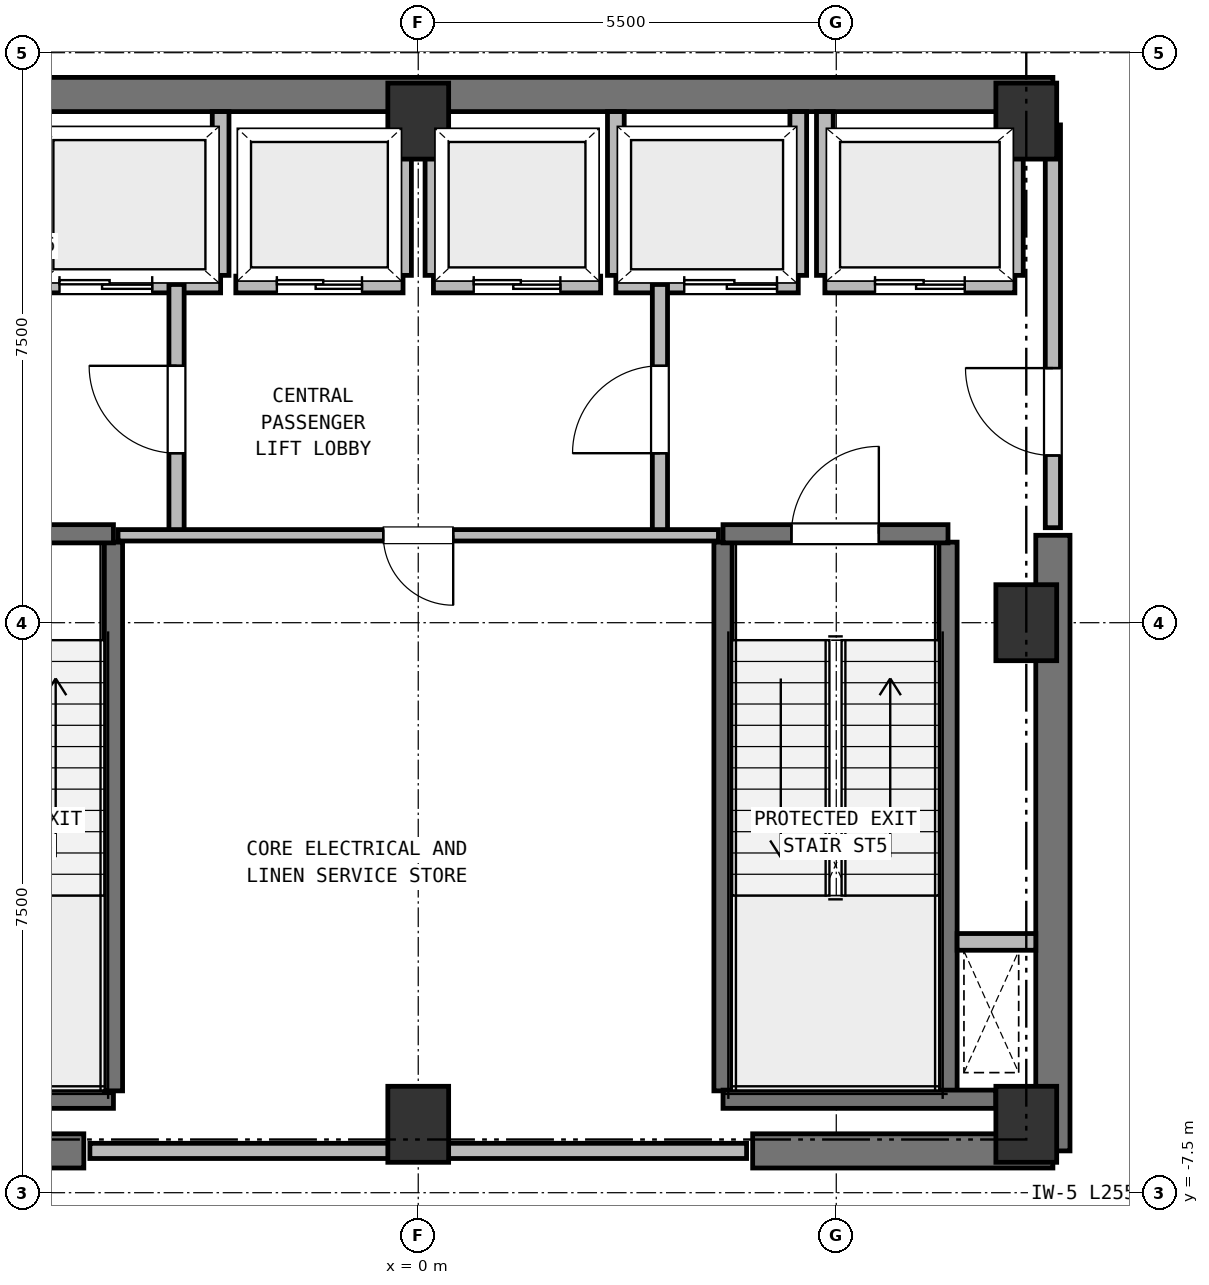
"""IFC4 building model, lengths in metres.
Left out: names, types, materials, properties, quantities, classifications, styles, units other than length and angle.
Written with IfcOpenShell. Run it as: python <this file> out.ifc"""

import sys

from ifc_helpers import new_model, si_unit, direction, frame, frame_2d, origin, origin_2d, place, context, subcontext, project, spatial, rectangle, extrude, element, fill, save


model = new_model("IFC4")
c1 = context("Model", 3, precision=1e-05, world=origin(), true_north=direction((0.0, 1.0)))
c2 = subcontext(c1, "Body", "Model", "MODEL_VIEW")
j1 = project(units=[si_unit("LENGTHUNIT", "METRE"), si_unit("PLANEANGLEUNIT", "RADIAN")], contexts=[c1])
p1 = place(None, origin())
s1 = spatial("IfcSite", under=j1, at=p1, CompositionType="ELEMENT")
p2 = place(p1, origin())
s2 = spatial("IfcBuilding", under=s1, at=p2, CompositionType="ELEMENT")
p3 = place(p2, frame((0.0, 0.0, 272.8)))
s3 = spatial("IfcBuildingStorey", under=s2, at=p3, CompositionType="ELEMENT", Elevation=272.8)
for number, where, z_axis, x_axis in (
    (1, (0.0, -6.6, 0.0), (0.0, 0.0, 1.0), (1.0, 0.0, 0.0)),
    (2, (8.0, -6.6, 0.0), (0.0, 0.0, 1.0), (1.0, 0.0, 0.0)),
    (3, (8.0, 0.0, 0.0), (0.0, 0.0, 1.0), (1.0, 0.0, 0.0)),
    (4, (8.0, 6.6, 0.0), (0.0, 0.0, 1.0), (1.0, 0.0, 0.0)),
    (5, (0.0, 6.6, 0.0), (0.0, 0.0, 1.0), (1.0, 0.0, 0.0)),
):
    element("IfcColumn", number, at=place(p3, frame(where, z_axis=z_axis, x_axis=x_axis)), inside=s3, PredefinedType="COLUMN", context=c2, shape_type="SweptSolid", body=[
        extrude(rectangle(XDim=0.8, YDim=1.0, at=origin_2d()), origin(), (0.0, 0.0, 1.0), 4.4),
    ])
p4 = place(p3, frame((-8.35, 6.95, 0.0), z_axis=(0.0, 0.0, 1.0), x_axis=(1.0, 0.0, 0.0)))
e6 = element("IfcWall", 6, at=p4, inside=s3, PredefinedType="SHEAR", context=c2, shape_type="SweptSolid", body=[
    extrude(rectangle(XDim=16.7, YDim=0.45, at=frame_2d((8.35, 0.0))), origin(), (0.0, 0.0, 1.0), 4.15),
])
for number, where, z_axis, x_axis in (
    (7, (-8.35, -6.95, 0.0), (0.0, 0.0, 1.0), (1.0, 0.0, 0.0)),
    (8, (4.4, -6.95, 0.0), (0.0, 0.0, 1.0), (1.0, 0.0, 0.0)),
):
    element("IfcWall", number, at=place(p3, frame(where, z_axis=z_axis, x_axis=x_axis)), inside=s3, PredefinedType="SHEAR", context=c2, shape_type="SweptSolid", body=[
        extrude(rectangle(XDim=3.95, YDim=0.45, at=frame_2d((1.975, 0.0))), origin(), (0.0, 0.0, 1.0), 4.15),
    ])
p5 = place(p3, frame((8.35, -6.95, 0.0), z_axis=(0.0, 0.0, 1.0), x_axis=(0.0, 1.0, 0.0)))
e9 = element("IfcWall", 9, at=p5, inside=s3, PredefinedType="SHEAR", context=c2, shape_type="SweptSolid", body=[
    extrude(rectangle(XDim=8.1, YDim=0.45, at=frame_2d((4.05, 0.0))), origin(), (0.0, 0.0, 1.0), 4.15),
])
p6 = place(p3, frame((-7.6, -6.27, 0.0), z_axis=(0.0, 0.0, 1.0), x_axis=(1.0, 0.0, 0.0)))
e10 = element("IfcWall", 10, at=p6, inside=s3, PredefinedType="SHEAR", context=c2, shape_type="SweptSolid", body=[
    extrude(rectangle(XDim=3.59, YDim=0.24, at=frame_2d((1.795, 0.0))), origin(), (0.0, 0.0, 1.0), 4.15),
])
p7 = place(p3, frame((-4.01, -6.16, 0.0), z_axis=(0.0, 0.0, 1.0), x_axis=(0.0, 1.0, 0.0)))
e11 = element("IfcWall", 11, at=p7, inside=s3, PredefinedType="SHEAR", context=c2, shape_type="SweptSolid", body=[
    extrude(rectangle(XDim=7.22, YDim=0.24, at=frame_2d((3.61, 0.0))), origin(), (0.0, 0.0, 1.0), 4.15),
])
p8 = place(p3, frame((-6.97, 1.17, 0.0), z_axis=(0.0, 0.0, 1.0), x_axis=(1.0, 0.0, 0.0)))
e12 = element("IfcWall", 12, at=p8, inside=s3, PredefinedType="SHEAR", context=c2, shape_type="SweptSolid", body=[
    extrude(rectangle(XDim=2.96, YDim=0.24, at=frame_2d((1.48, 0.0))), origin(), (0.0, 0.0, 1.0), 4.15),
])
p9 = place(p8, frame((0.9, 0.0, 0.0)))
e13 = element("IfcOpeningElement", 13, at=p9, cuts=e12, PredefinedType="OPENING", context=c2, shape_type="SweptSolid", body=[
    extrude(rectangle(XDim=1.15, YDim=2.15, at=frame_2d((0.575, 1.075))), frame((0.0, 0.13, 0.0), z_axis=(0.0, -1.0, 0.0), x_axis=(1.0, 0.0, 0.0)), (0.0, 0.0, 1.0), 0.26),
])
for number, where, z_axis, x_axis in (
    (14, (4.01, -6.16, 0.0), (0.0, 0.0, 1.0), (0.0, 1.0, 0.0)),
    (15, (6.97, -6.16, 0.0), (0.0, 0.0, 1.0), (0.0, 1.0, 0.0)),
):
    element("IfcWall", number, at=place(p3, frame(where, z_axis=z_axis, x_axis=x_axis)), inside=s3, PredefinedType="SHEAR", context=c2, shape_type="SweptSolid", body=[
        extrude(rectangle(XDim=7.22, YDim=0.24, at=frame_2d((3.61, 0.0))), origin(), (0.0, 0.0, 1.0), 4.15),
    ])
p10 = place(p3, frame((4.01, -6.27, 0.0), z_axis=(0.0, 0.0, 1.0), x_axis=(1.0, 0.0, 0.0)))
e16 = element("IfcWall", 16, at=p10, inside=s3, PredefinedType="SHEAR", context=c2, shape_type="SweptSolid", body=[
    extrude(rectangle(XDim=3.59, YDim=0.24, at=frame_2d((1.795, 0.0))), origin(), (0.0, 0.0, 1.0), 4.15),
])
p11 = place(p3, frame((4.01, 1.17, 0.0), z_axis=(0.0, 0.0, 1.0), x_axis=(1.0, 0.0, 0.0)))
e17 = element("IfcWall", 17, at=p11, inside=s3, PredefinedType="SHEAR", context=c2, shape_type="SweptSolid", body=[
    extrude(rectangle(XDim=2.96, YDim=0.24, at=frame_2d((1.48, 0.0))), origin(), (0.0, 0.0, 1.0), 4.15),
])
p12 = place(p11, frame((0.9, 0.0, 0.0)))
e18 = element("IfcOpeningElement", 18, at=p12, cuts=e17, PredefinedType="OPENING", context=c2, shape_type="SweptSolid", body=[
    extrude(rectangle(XDim=1.15, YDim=2.15, at=frame_2d((0.575, 1.075))), frame((0.0, 0.13, 0.0), z_axis=(0.0, -1.0, 0.0), x_axis=(1.0, 0.0, 0.0)), (0.0, 0.0, 1.0), 0.26),
])
p13 = place(p3, frame((7.09, -4.2, 0.0), z_axis=(0.0, 0.0, 1.0), x_axis=(1.0, 0.0, 0.0)))
e19 = element("IfcWall", 19, at=p13, inside=s3, PredefinedType="PARTITIONING", context=c2, shape_type="SweptSolid", body=[
    extrude(rectangle(XDim=1.035, YDim=0.22, at=frame_2d((0.518, 0.0))), origin(), (0.0, 0.0, 1.0), 4.15),
])
p14 = place(p3, frame((5.35, 4.45, 0.0), z_axis=(0.0, 0.0, 1.0), x_axis=(1.0, 0.0, 0.0)))
e20 = element("IfcWall", 20, at=p14, inside=s3, PredefinedType="PARTITIONING", context=c2, shape_type="SweptSolid", body=[
    extrude(rectangle(XDim=2.5, YDim=0.22, at=frame_2d((1.25, 0.0))), origin(), (0.0, 0.0, 1.0), 4.15),
])
p15 = place(p14, frame((0.66, 0.0, 0.0)))
e21 = element("IfcOpeningElement", 21, at=p15, cuts=e20, PredefinedType="OPENING", context=c2, shape_type="SweptSolid", body=[
    extrude(rectangle(XDim=1.18, YDim=2.15, at=frame_2d((0.59, 1.075))), frame((0.0, 0.12, 0.0), z_axis=(0.0, -1.0, 0.0), x_axis=(1.0, 0.0, 0.0)), (0.0, 0.0, 1.0), 0.24),
])
p16 = place(p3, frame((5.35, 4.57, 0.0), z_axis=(0.0, 0.0, 1.0), x_axis=(0.0, 1.0, 0.0)))
e22 = element("IfcWall", 22, at=p16, inside=s3, PredefinedType="PARTITIONING", context=c2, shape_type="SweptSolid", body=[
    extrude(rectangle(XDim=2.155, YDim=0.22, at=frame_2d((1.078, 0.0))), origin(), (0.0, 0.0, 1.0), 4.15),
])
p17 = place(p3, frame((7.85, 4.57, 0.0), z_axis=(0.0, 0.0, 1.0), x_axis=(0.0, 1.0, 0.0)))
e23 = element("IfcWall", 23, at=p17, inside=s3, PredefinedType="PARTITIONING", context=c2, shape_type="SweptSolid", body=[
    extrude(rectangle(XDim=2.155, YDim=0.22, at=frame_2d((1.078, 0.0))), origin(), (0.0, 0.0, 1.0), 3.83),
])
p18 = place(p3, frame((-5.0, 4.45, 0.0), z_axis=(0.0, 0.0, 1.0), x_axis=(1.0, 0.0, 0.0)))
e24 = element("IfcWall", 24, at=p18, inside=s3, PredefinedType="PARTITIONING", context=c2, shape_type="SweptSolid", body=[
    extrude(rectangle(XDim=2.4, YDim=0.22, at=frame_2d((1.2, 0.0))), origin(), (0.0, 0.0, 1.0), 4.15),
])
p19 = place(p18, frame((0.28, 0.0, 0.0)))
e25 = element("IfcOpeningElement", 25, at=p19, cuts=e24, PredefinedType="OPENING", context=c2, shape_type="SweptSolid", body=[
    extrude(rectangle(XDim=1.22, YDim=2.15, at=frame_2d((0.61, 1.075))), frame((0.0, 0.12, 0.0), z_axis=(0.0, -1.0, 0.0), x_axis=(1.0, 0.0, 0.0)), (0.0, 0.0, 1.0), 0.24),
])
p20 = place(p3, frame((-2.6, 4.57, 0.0), z_axis=(0.0, 0.0, 1.0), x_axis=(0.0, 1.0, 0.0)))
e26 = element("IfcWall", 26, at=p20, inside=s3, PredefinedType="PARTITIONING", context=c2, shape_type="SweptSolid", body=[
    extrude(rectangle(XDim=2.155, YDim=0.22, at=frame_2d((1.078, 0.0))), origin(), (0.0, 0.0, 1.0), 4.15),
])
p21 = place(p3, frame((2.6, 4.45, 0.0), z_axis=(0.0, 0.0, 1.0), x_axis=(1.0, 0.0, 0.0)))
e27 = element("IfcWall", 27, at=p21, inside=s3, PredefinedType="PARTITIONING", context=c2, shape_type="SweptSolid", body=[
    extrude(rectangle(XDim=2.4, YDim=0.22, at=frame_2d((1.2, 0.0))), origin(), (0.0, 0.0, 1.0), 4.15),
])
p22 = place(p21, frame((0.9, 0.0, 0.0)))
e28 = element("IfcOpeningElement", 28, at=p22, cuts=e27, PredefinedType="OPENING", context=c2, shape_type="SweptSolid", body=[
    extrude(rectangle(XDim=1.22, YDim=2.15, at=frame_2d((0.61, 1.075))), frame((0.0, 0.12, 0.0), z_axis=(0.0, -1.0, 0.0), x_axis=(1.0, 0.0, 0.0)), (0.0, 0.0, 1.0), 0.24),
])
for number, where, z_axis, x_axis in (
    (29, (2.6, 4.57, 0.0), (0.0, 0.0, 1.0), (0.0, 1.0, 0.0)),
    (30, (5.0, 4.57, 0.0), (0.0, 0.0, 1.0), (0.0, 1.0, 0.0)),
):
    element("IfcWall", number, at=place(p3, frame(where, z_axis=z_axis, x_axis=x_axis)), inside=s3, PredefinedType="PARTITIONING", context=c2, shape_type="SweptSolid", body=[
        extrude(rectangle(XDim=2.155, YDim=0.22, at=frame_2d((1.078, 0.0))), origin(), (0.0, 0.0, 1.0), 4.15),
    ])
p23 = place(p3, frame((-2.4, 4.45, 0.0), z_axis=(0.0, 0.0, 1.0), x_axis=(1.0, 0.0, 0.0)))
e31 = element("IfcWall", 31, at=p23, inside=s3, PredefinedType="PARTITIONING", context=c2, shape_type="SweptSolid", body=[
    extrude(rectangle(XDim=2.2, YDim=0.22, at=frame_2d((1.1, 0.0))), origin(), (0.0, 0.0, 1.0), 4.15),
])
p24 = place(p23, frame((0.54, 0.0, 0.0)))
e32 = element("IfcOpeningElement", 32, at=p24, cuts=e31, PredefinedType="OPENING", context=c2, shape_type="SweptSolid", body=[
    extrude(rectangle(XDim=1.12, YDim=2.15, at=frame_2d((0.56, 1.075))), frame((0.0, 0.12, 0.0), z_axis=(0.0, -1.0, 0.0), x_axis=(1.0, 0.0, 0.0)), (0.0, 0.0, 1.0), 0.24),
])
p25 = place(p3, frame((-0.2, 4.57, 0.0), z_axis=(0.0, 0.0, 1.0), x_axis=(0.0, 1.0, 0.0)))
e33 = element("IfcWall", 33, at=p25, inside=s3, PredefinedType="PARTITIONING", context=c2, shape_type="SweptSolid", body=[
    extrude(rectangle(XDim=2.155, YDim=0.22, at=frame_2d((1.078, 0.0))), origin(), (0.0, 0.0, 1.0), 4.15),
])
p26 = place(p3, frame((0.2, 4.45, 0.0), z_axis=(0.0, 0.0, 1.0), x_axis=(1.0, 0.0, 0.0)))
e34 = element("IfcWall", 34, at=p26, inside=s3, PredefinedType="PARTITIONING", context=c2, shape_type="SweptSolid", body=[
    extrude(rectangle(XDim=2.2, YDim=0.22, at=frame_2d((1.1, 0.0))), origin(), (0.0, 0.0, 1.0), 4.15),
])
p27 = place(p26, frame((0.53, 0.0, 0.0)))
e35 = element("IfcOpeningElement", 35, at=p27, cuts=e34, PredefinedType="OPENING", context=c2, shape_type="SweptSolid", body=[
    extrude(rectangle(XDim=1.14, YDim=2.15, at=frame_2d((0.57, 1.075))), frame((0.0, 0.12, 0.0), z_axis=(0.0, -1.0, 0.0), x_axis=(1.0, 0.0, 0.0)), (0.0, 0.0, 1.0), 0.24),
])
p28 = place(p3, frame((0.2, 4.57, 0.0), z_axis=(0.0, 0.0, 1.0), x_axis=(0.0, 1.0, 0.0)))
e36 = element("IfcWall", 36, at=p28, inside=s3, PredefinedType="PARTITIONING", context=c2, shape_type="SweptSolid", body=[
    extrude(rectangle(XDim=2.155, YDim=0.22, at=frame_2d((1.078, 0.0))), origin(), (0.0, 0.0, 1.0), 4.15),
])
p29 = place(p3, frame((-3.18, 1.15, 0.0), z_axis=(0.0, 0.0, 1.0), x_axis=(0.0, 1.0, 0.0)))
e37 = element("IfcWall", 37, at=p29, inside=s3, PredefinedType="PARTITIONING", context=c2, shape_type="SweptSolid", body=[
    extrude(rectangle(XDim=3.3, YDim=0.2, at=frame_2d((1.65, 0.0))), origin(), (0.0, 0.0, 1.0), 4.15),
])
p30 = place(p29, frame((1.08, 0.0, 0.0)))
e38 = element("IfcOpeningElement", 38, at=p30, cuts=e37, PredefinedType="OPENING", context=c2, shape_type="SweptSolid", body=[
    extrude(rectangle(XDim=1.15, YDim=2.15, at=frame_2d((0.575, 1.075))), frame((0.0, 0.11, 0.0), z_axis=(0.0, -1.0, 0.0), x_axis=(1.0, 0.0, 0.0)), (0.0, 0.0, 1.0), 0.22),
])
p31 = place(p3, frame((3.18, 1.15, 0.0), z_axis=(0.0, 0.0, 1.0), x_axis=(0.0, 1.0, 0.0)))
e39 = element("IfcWall", 39, at=p31, inside=s3, PredefinedType="PARTITIONING", context=c2, shape_type="SweptSolid", body=[
    extrude(rectangle(XDim=3.3, YDim=0.2, at=frame_2d((1.65, 0.0))), origin(), (0.0, 0.0, 1.0), 4.15),
])
p32 = place(p31, frame((1.08, 0.0, 0.0)))
e40 = element("IfcOpeningElement", 40, at=p32, cuts=e39, PredefinedType="OPENING", context=c2, shape_type="SweptSolid", body=[
    extrude(rectangle(XDim=1.15, YDim=2.15, at=frame_2d((0.575, 1.075))), frame((0.0, 0.11, 0.0), z_axis=(0.0, -1.0, 0.0), x_axis=(1.0, 0.0, 0.0)), (0.0, 0.0, 1.0), 0.22),
])
p33 = place(p3, frame((8.35, 1.25, 0.0), z_axis=(0.0, 0.0, 1.0), x_axis=(0.0, 1.0, 0.0)))
e41 = element("IfcWall", 41, at=p33, inside=s3, PredefinedType="PARTITIONING", context=c2, shape_type="SweptSolid", body=[
    extrude(rectangle(XDim=5.3, YDim=0.2, at=frame_2d((2.65, 0.0))), origin(), (0.0, 0.0, 1.0), 4.15),
])
p34 = place(p33, frame((0.95, 0.0, 0.0)))
e42 = element("IfcOpeningElement", 42, at=p34, cuts=e41, PredefinedType="OPENING", context=c2, shape_type="SweptSolid", body=[
    extrude(rectangle(XDim=1.15, YDim=2.15, at=frame_2d((0.575, 1.075))), frame((0.0, 0.11, 0.0), z_axis=(0.0, -1.0, 0.0), x_axis=(1.0, 0.0, 0.0)), (0.0, 0.0, 1.0), 0.22),
])
p35 = place(p3, frame((3.95, 1.15, 0.0), z_axis=(0.0, 0.0, 1.0), x_axis=(-1.0, 0.0, 0.0)))
e43 = element("IfcWall", 43, at=p35, inside=s3, PredefinedType="PARTITIONING", context=c2, shape_type="SweptSolid", body=[
    extrude(rectangle(XDim=7.9, YDim=0.15, at=frame_2d((3.95, 0.0))), origin(), (0.0, 0.0, 1.0), 4.15),
])
p36 = place(p35, frame((3.49, 0.0, 0.0)))
e44 = element("IfcOpeningElement", 44, at=p36, cuts=e43, PredefinedType="OPENING", context=c2, shape_type="SweptSolid", body=[
    extrude(rectangle(XDim=0.92, YDim=2.05, at=frame_2d((0.46, 1.025))), frame((0.0, 0.085, 0.0), z_axis=(0.0, -1.0, 0.0), x_axis=(1.0, 0.0, 0.0)), (0.0, 0.0, 1.0), 0.17),
])
p37 = place(p3, frame((-4.32, -6.95, 0.0), z_axis=(0.0, 0.0, 1.0), x_axis=(1.0, 0.0, 0.0)))
e45 = element("IfcWall", 45, at=p37, inside=s3, PredefinedType="PARTITIONING", context=c2, shape_type="SweptSolid", body=[
    extrude(rectangle(XDim=8.64, YDim=0.2, at=frame_2d((4.32, 0.0))), origin(), (0.0, 0.0, 1.0), 4.15),
])
p38 = place(p3, frame((10.422, -7.309, 0.0), z_axis=(0.0, 0.0, 1.0), x_axis=(-0.693764562202, -0.720201869085, 0.0)))
e46 = element("IfcWall", 46, at=p38, inside=s3, PredefinedType="PARTITIONING", context=c2, shape_type="SweptSolid", body=[
    extrude(rectangle(XDim=2.558, YDim=0.15, at=frame_2d((1.279, 0.0))), origin(), (0.0, 0.0, 1.0), 4.15),
])
p39 = place(p12, origin())
e47 = element("IfcDoor", 47, at=p39, inside=s3, OperationType="SINGLE_SWING_RIGHT", PredefinedType="DOOR", context=c2, shape_type="SweptSolid", body=[
    extrude(rectangle(XDim=1.15, YDim=2.15, at=frame_2d((0.575, 1.075))), frame((0.0, 0.025, 0.0), z_axis=(0.0, -1.0, 0.0), x_axis=(1.0, 0.0, 0.0)), (0.0, 0.0, 1.0), 0.05),
])
fill(e18, e47)
p40 = place(p15, origin())
e48 = element("IfcDoor", 48, at=p40, inside=s3, OperationType="DOUBLE_DOOR_SLIDING", PredefinedType="DOOR", context=c2, shape_type="SweptSolid", body=[
    extrude(rectangle(XDim=1.18, YDim=2.15, at=frame_2d((0.59, 1.075))), frame((0.0, 0.025, 0.0), z_axis=(0.0, -1.0, 0.0), x_axis=(1.0, 0.0, 0.0)), (0.0, 0.0, 1.0), 0.05),
])
fill(e21, e48)
p41 = place(p19, origin())
e49 = element("IfcDoor", 49, at=p41, inside=s3, OperationType="DOUBLE_DOOR_SLIDING", PredefinedType="DOOR", context=c2, shape_type="SweptSolid", body=[
    extrude(rectangle(XDim=1.22, YDim=2.15, at=frame_2d((0.61, 1.075))), frame((0.0, 0.025, 0.0), z_axis=(0.0, -1.0, 0.0), x_axis=(1.0, 0.0, 0.0)), (0.0, 0.0, 1.0), 0.05),
])
fill(e25, e49)
p42 = place(p22, origin())
e50 = element("IfcDoor", 50, at=p42, inside=s3, OperationType="DOUBLE_DOOR_SLIDING", PredefinedType="DOOR", context=c2, shape_type="SweptSolid", body=[
    extrude(rectangle(XDim=1.22, YDim=2.15, at=frame_2d((0.61, 1.075))), frame((0.0, 0.025, 0.0), z_axis=(0.0, -1.0, 0.0), x_axis=(1.0, 0.0, 0.0)), (0.0, 0.0, 1.0), 0.05),
])
fill(e28, e50)
p43 = place(p24, origin())
e51 = element("IfcDoor", 51, at=p43, inside=s3, OperationType="DOUBLE_DOOR_SLIDING", PredefinedType="DOOR", context=c2, shape_type="SweptSolid", body=[
    extrude(rectangle(XDim=1.12, YDim=2.15, at=frame_2d((0.56, 1.075))), frame((0.0, 0.025, 0.0), z_axis=(0.0, -1.0, 0.0), x_axis=(1.0, 0.0, 0.0)), (0.0, 0.0, 1.0), 0.05),
])
fill(e32, e51)
p44 = place(p27, origin())
e52 = element("IfcDoor", 52, at=p44, inside=s3, OperationType="DOUBLE_DOOR_SLIDING", PredefinedType="DOOR", context=c2, shape_type="SweptSolid", body=[
    extrude(rectangle(XDim=1.14, YDim=2.15, at=frame_2d((0.57, 1.075))), frame((0.0, 0.025, 0.0), z_axis=(0.0, -1.0, 0.0), x_axis=(1.0, 0.0, 0.0)), (0.0, 0.0, 1.0), 0.05),
])
fill(e35, e52)
p45 = place(p30, origin())
e53 = element("IfcDoor", 53, at=p45, inside=s3, OperationType="SINGLE_SWING_RIGHT", PredefinedType="DOOR", context=c2, shape_type="SweptSolid", body=[
    extrude(rectangle(XDim=1.15, YDim=2.15, at=frame_2d((0.575, 1.075))), frame((0.0, 0.025, 0.0), z_axis=(0.0, -1.0, 0.0), x_axis=(1.0, 0.0, 0.0)), (0.0, 0.0, 1.0), 0.05),
])
fill(e38, e53)
p46 = place(p32, origin())
e54 = element("IfcDoor", 54, at=p46, inside=s3, OperationType="SINGLE_SWING_LEFT", PredefinedType="DOOR", context=c2, shape_type="SweptSolid", body=[
    extrude(rectangle(XDim=1.15, YDim=2.15, at=frame_2d((0.575, 1.075))), frame((0.0, 0.025, 0.0), z_axis=(0.0, -1.0, 0.0), x_axis=(1.0, 0.0, 0.0)), (0.0, 0.0, 1.0), 0.05),
])
fill(e40, e54)
p47 = place(p34, origin())
e55 = element("IfcDoor", 55, at=p47, inside=s3, OperationType="SINGLE_SWING_RIGHT", PredefinedType="DOOR", context=c2, shape_type="SweptSolid", body=[
    extrude(rectangle(XDim=1.15, YDim=2.15, at=frame_2d((0.575, 1.075))), frame((0.0, 0.025, 0.0), z_axis=(0.0, -1.0, 0.0), x_axis=(1.0, 0.0, 0.0)), (0.0, 0.0, 1.0), 0.05),
])
fill(e42, e55)
p48 = place(p36, origin())
e56 = element("IfcDoor", 56, at=p48, inside=s3, OperationType="SINGLE_SWING_LEFT", PredefinedType="DOOR", context=c2, shape_type="SweptSolid", body=[
    extrude(rectangle(XDim=0.92, YDim=2.05, at=frame_2d((0.46, 1.025))), frame((0.0, 0.025, 0.0), z_axis=(0.0, -1.0, 0.0), x_axis=(1.0, 0.0, 0.0)), (0.0, 0.0, 1.0), 0.05),
])
fill(e44, e56)
save(model, sys.argv[1])
